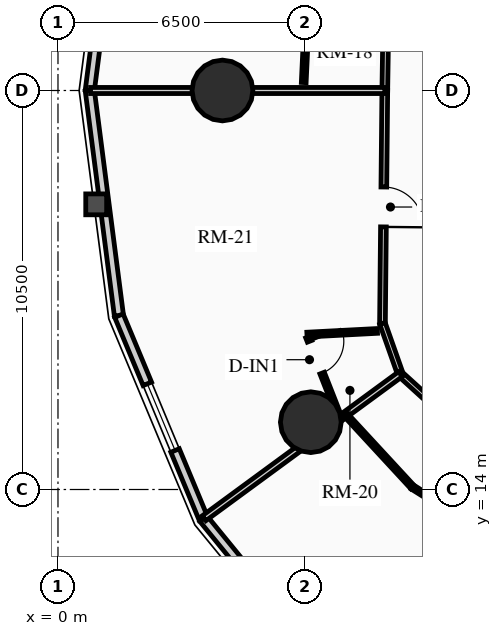
"""IFC4 building model, lengths in metres.
Left out: names, types, materials, properties, quantities, classifications, styles, units other than length and angle.
Written with IfcOpenShell. Run it as: python <this file> out.ifc"""

import sys

from ifc_helpers import new_model, si_unit, direction, frame, frame_2d, origin, origin_2d, place, context, subcontext, project, spatial, rectangle, circle, extrude, source, transform, mapped, element, fill, save


model = new_model("IFC4")
c1 = context("Model", 3, precision=1e-05, world=origin(), true_north=direction((0.0, 1.0)))
c2 = subcontext(c1, "Body", "Model", "MODEL_VIEW")
j1 = project(units=[si_unit("LENGTHUNIT", "METRE"), si_unit("PLANEANGLEUNIT", "RADIAN")], contexts=[c1])
p1 = place(None, origin())
s1 = spatial("IfcSite", under=j1, at=p1, CompositionType="ELEMENT")
p2 = place(p1, origin())
s2 = spatial("IfcBuilding", under=s1, at=p2, CompositionType="ELEMENT")
p3 = place(p2, frame((0.0, 0.0, 51.1)))
s3 = spatial("IfcBuildingStorey", under=s2, at=p3, CompositionType="ELEMENT", Elevation=51.1)
for number, where, z_axis, x_axis in (
    (1, (4.328, 24.5, 0.0), (0.0, 0.0, 1.0), (1.0, 0.0, 0.0)),
    (2, (6.653, 15.771, 0.0), (0.0, 0.0, 1.0), (1.0, 0.0, 0.0)),
):
    element("IfcColumn", number, at=place(p3, frame(where, z_axis=z_axis, x_axis=x_axis)), inside=s3, PredefinedType="USERDEFINED", context=c2, shape_type="SweptSolid", body=[
        extrude(circle(Radius=0.8, at=origin_2d()), origin(), (0.0, 0.0, 1.0), 2.91),
    ])
p4 = place(p3, frame((0.837, 24.5, 0.0), z_axis=(0.0, 0.0, 1.0), x_axis=(0.128339641463, 0.991730274031, 0.0)))
e3 = element("IfcWall", 3, at=p4, inside=s3, PredefinedType="SOLIDWALL", context=c2, shape_type="SweptSolid", body=[
    extrude(rectangle(XDim=5.973, YDim=0.24, at=frame_2d((2.987, 0.0))), origin(), (0.0, 0.0, 1.0), 2.073),
])
m1 = source(origin(), c2, "Body", "SweptSolid", [
    extrude(rectangle(XDim=2.2, YDim=1.35, at=frame_2d((1.1, 0.675))), frame((0.0, 0.13, 0.0), z_axis=(0.0, -1.0, 0.0), x_axis=(1.0, 0.0, 0.0)), (0.0, 0.0, 1.0), 0.26),
])
p5 = place(p4, frame((1.887, 0.0, 0.65)))
e4 = element("IfcOpeningElement", 4, at=p5, cuts=e3, PredefinedType="OPENING", context=c2, shape_type="MappedRepresentation", body=[
    mapped(m1, transform((0.0, 0.0, 0.0), x_axis=(1.0, 0.0, 0.0), y_axis=(0.0, 1.0, 0.0), z_axis=(0.0, 0.0, 1.0), scale=1.0)),
])
p6 = place(p3, frame((1.604, 18.576, 0.0), z_axis=(0.0, 0.0, 1.0), x_axis=(-0.128339641463, 0.991730274031, 0.0)))
e5 = element("IfcWall", 5, at=p6, inside=s3, PredefinedType="SOLIDWALL", context=c2, shape_type="SweptSolid", body=[
    extrude(rectangle(XDim=5.973, YDim=0.24, at=frame_2d((2.987, 0.0))), origin(), (0.0, 0.0, 1.0), 2.073),
])
p7 = place(p3, frame((3.828, 13.232, 0.0), z_axis=(0.0, 0.0, 1.0), x_axis=(-0.384348836956, 0.923187939442, 0.0)))
e6 = element("IfcWall", 6, at=p7, inside=s3, PredefinedType="SOLIDWALL", context=c2, shape_type="SweptSolid", body=[
    extrude(rectangle(XDim=5.789, YDim=0.24, at=frame_2d((2.894, 0.0))), origin(), (0.0, 0.0, 1.0), 2.073),
])
m2 = source(origin(), c2, "Body", "SweptSolid", [
    extrude(rectangle(XDim=1.9, YDim=1.35, at=frame_2d((0.95, 0.675))), frame((0.0, 0.13, 0.0), z_axis=(0.0, -1.0, 0.0), x_axis=(1.0, 0.0, 0.0)), (0.0, 0.0, 1.0), 0.26),
])
p8 = place(p7, frame((1.944, 0.0, 0.65)))
e7 = element("IfcOpeningElement", 7, at=p8, cuts=e6, PredefinedType="OPENING", context=c2, shape_type="MappedRepresentation", body=[
    mapped(m2, transform((0.0, 0.0, 0.0), x_axis=(1.0, 0.0, 0.0), y_axis=(0.0, 1.0, 0.0), z_axis=(0.0, 0.0, 1.0), scale=1.0)),
])
p9 = place(p3, frame((7.293, 8.991, 0.0), z_axis=(0.0, 0.0, 1.0), x_axis=(-0.632713287022, 0.77438614168, 0.0)))
e8 = element("IfcWall", 8, at=p9, inside=s3, PredefinedType="SOLIDWALL", context=c2, shape_type="SweptSolid", body=[
    extrude(rectangle(XDim=5.477, YDim=0.24, at=frame_2d((2.738, 0.0))), origin(), (0.0, 0.0, 1.0), 2.073),
])
p10 = place(p3, frame((8.693, 30.512, 0.0), z_axis=(0.0, 0.0, 1.0), x_axis=(-0.015389665197, -0.99988157209, 0.0)))
e9 = element("IfcWall", 9, at=p10, inside=s3, PredefinedType="PARTITIONING", context=c2, shape_type="SweptSolid", body=[
    extrude(rectangle(XDim=6.012, YDim=0.15, at=frame_2d((3.006, 0.0))), origin(), (0.0, 0.0, 1.0), 2.635),
])
p11 = place(p3, frame((8.6, 24.5, 0.0), z_axis=(0.0, 0.0, 1.0), x_axis=(-0.010076760723, -0.999949228158, 0.0)))
e10 = element("IfcWall", 10, at=p11, inside=s3, PredefinedType="PARTITIONING", context=c2, shape_type="SweptSolid", body=[
    extrude(rectangle(XDim=6.13, YDim=0.15, at=frame_2d((3.065, 0.0))), origin(), (0.0, 0.0, 1.0), 2.159),
])
m3 = source(origin(), c2, "Body", "SweptSolid", [
    extrude(rectangle(XDim=1.05, YDim=2.015, at=frame_2d((0.525, 1.007))), frame((0.0, 0.085, 0.0), z_axis=(0.0, -1.0, 0.0), x_axis=(1.0, 0.0, 0.0)), (0.0, 0.0, 1.0), 0.17),
])
p12 = place(p11, frame((2.54, 0.0, 0.0)))
e11 = element("IfcOpeningElement", 11, at=p12, cuts=e10, PredefinedType="OPENING", context=c2, shape_type="MappedRepresentation", body=[
    mapped(m3, transform((0.0, 0.0, 0.0), x_axis=(1.0, 0.0, 0.0), y_axis=(0.0, 1.0, 0.0), z_axis=(0.0, 0.0, 1.0), scale=1.0)),
])
p13 = place(p3, frame((8.538, 18.371, 0.0), z_axis=(0.0, 0.0, 1.0), x_axis=(0.3330273821, -0.942917155837, 0.0)))
e12 = element("IfcWall", 12, at=p13, inside=s3, PredefinedType="PARTITIONING", context=c2, shape_type="SweptSolid", body=[
    extrude(rectangle(XDim=1.417, YDim=0.15, at=frame_2d((0.708, 0.0))), origin(), (0.0, 0.0, 1.0), 2.205),
])
p14 = place(p3, frame((9.01, 17.034, 0.0), z_axis=(0.0, 0.0, 1.0), x_axis=(0.739733009791, -0.672900493554, 0.0)))
e13 = element("IfcWall", 13, at=p14, inside=s3, PredefinedType="PARTITIONING", context=c2, shape_type="SweptSolid", body=[
    extrude(rectangle(XDim=1.494, YDim=0.15, at=frame_2d((0.747, 0.0))), origin(), (0.0, 0.0, 1.0), 2.159),
])
p15 = place(p3, frame((8.6, 24.5, 0.0), z_axis=(0.0, 0.0, 1.0), x_axis=(-1.0, 0.0, 0.0)))
e14 = element("IfcWall", 14, at=p15, inside=s3, PredefinedType="PARTITIONING", context=c2, shape_type="SweptSolid", body=[
    extrude(rectangle(XDim=7.743, YDim=0.16, at=frame_2d((3.872, 0.0))), origin(), (0.0, 0.0, 1.0), 2.073),
])
p16 = place(p3, frame((9.01, 17.034, 0.0), z_axis=(0.0, 0.0, 1.0), x_axis=(-0.806234156757, -0.591596555499, 0.0)))
e15 = element("IfcWall", 15, at=p16, inside=s3, PredefinedType="PARTITIONING", context=c2, shape_type="SweptSolid", body=[
    extrude(rectangle(XDim=6.407, YDim=0.16, at=frame_2d((3.204, 0.0))), origin(), (0.0, 0.0, 1.0), 2.073),
])
p17 = place(p3, frame((6.6, 27.583, 0.0), z_axis=(0.0, 0.0, 1.0), x_axis=(-0.046516553412, -0.998917519247, 0.0)))
e16 = element("IfcWall", 16, at=p17, inside=s3, PredefinedType="PARTITIONING", context=c2, shape_type="SweptSolid", body=[
    extrude(rectangle(XDim=2.876, YDim=0.125, at=frame_2d((1.438, 0.0))), origin(), (0.0, 0.0, 1.0), 2.635),
])
m4 = source(origin(), c2, "Body", "SweptSolid", [
    extrude(rectangle(XDim=0.9, YDim=2.005, at=frame_2d((0.45, 1.002))), frame((0.0, 0.073, 0.0), z_axis=(0.0, -1.0, 0.0), x_axis=(1.0, 0.0, 0.0)), (0.0, 0.0, 1.0), 0.145),
])
p18 = place(p17, frame((0.12, 0.0, 0.0)))
e17 = element("IfcOpeningElement", 17, at=p18, cuts=e16, PredefinedType="OPENING", context=c2, shape_type="MappedRepresentation", body=[
    mapped(m4, transform((0.0, 0.0, 0.0), x_axis=(1.0, 0.0, 0.0), y_axis=(0.0, 1.0, 0.0), z_axis=(0.0, 0.0, 1.0), scale=1.0)),
])
p19 = place(p3, frame((8.404, 18.173, 0.0), z_axis=(0.0, 0.0, 1.0), x_axis=(-0.998640999178, -0.052116741655, 0.0)))
e18 = element("IfcWall", 18, at=p19, inside=s3, PredefinedType="PARTITIONING", context=c2, shape_type="SweptSolid", body=[
    extrude(rectangle(XDim=1.855, YDim=0.125, at=frame_2d((0.927, 0.0))), origin(), (0.0, 0.0, 1.0), 2.205),
])
p20 = place(p3, frame((6.577, 18.012, 0.0), z_axis=(0.0, 0.0, 1.0), x_axis=(0.366179258149, -0.930544330433, 0.0)))
e19 = element("IfcWall", 19, at=p20, inside=s3, PredefinedType="PARTITIONING", context=c2, shape_type="SweptSolid", body=[
    extrude(rectangle(XDim=2.208, YDim=0.125, at=frame_2d((1.104, 0.0))), origin(), (0.0, 0.0, 1.0), 2.159),
])
p21 = place(p20, frame((0.12, 0.0, 0.0)))
e20 = element("IfcOpeningElement", 20, at=p21, cuts=e19, PredefinedType="OPENING", context=c2, shape_type="MappedRepresentation", body=[
    mapped(m4, transform((0.0, 0.0, 0.0), x_axis=(1.0, 0.0, 0.0), y_axis=(0.0, 1.0, 0.0), z_axis=(0.0, 0.0, 1.0), scale=1.0)),
])
p22 = place(p3, frame((7.564, 15.973, 0.0), z_axis=(0.0, 0.0, 1.0), x_axis=(0.678576389573, -0.734529838409, 0.0)))
e21 = element("IfcWall", 21, at=p22, inside=s3, PredefinedType="PARTITIONING", context=c2, shape_type="SweptSolid", body=[
    extrude(rectangle(XDim=2.601, YDim=0.125, at=frame_2d((1.3, 0.0))), origin(), (0.0, 0.0, 1.0), 2.635),
])
p23 = place(p3, frame((9.329, 14.063, 0.0), z_axis=(0.0, 0.0, 1.0), x_axis=(0.846882074778, -0.531780736225, 0.0)))
e22 = element("IfcWall", 22, at=p23, inside=s3, PredefinedType="PARTITIONING", context=c2, shape_type="SweptSolid", body=[
    extrude(rectangle(XDim=2.585, YDim=0.125, at=frame_2d((1.292, 0.0))), origin(), (0.0, 0.0, 1.0), 2.205),
])
m5 = source(origin(), c2, "Body", "SweptSolid", [
    extrude(rectangle(XDim=1.9, YDim=1.35, at=frame_2d((0.95, 0.675))), frame((0.0, 0.03, 0.0), z_axis=(0.0, -1.0, 0.0), x_axis=(1.0, 0.0, 0.0)), (0.0, 0.0, 1.0), 0.06),
])
p24 = place(p8, origin())
e23 = element("IfcWindow", 23, at=p24, inside=s3, PartitioningType="DOUBLE_PANEL_VERTICAL", PredefinedType="WINDOW", context=c2, shape_type="MappedRepresentation", body=[
    mapped(m5, transform((0.0, 0.0, 0.0), x_axis=(1.0, 0.0, 0.0), y_axis=(0.0, 1.0, 0.0), z_axis=(0.0, 0.0, 1.0), scale=1.0)),
])
fill(e7, e23)
m6 = source(origin(), c2, "Body", "SweptSolid", [
    extrude(rectangle(XDim=1.05, YDim=2.015, at=frame_2d((0.525, 1.007))), frame((0.0, 0.025, 0.0), z_axis=(0.0, -1.0, 0.0), x_axis=(1.0, 0.0, 0.0)), (0.0, 0.0, 1.0), 0.05),
])
p25 = place(p12, origin())
e24 = element("IfcDoor", 24, at=p25, inside=s3, OperationType="SINGLE_SWING_RIGHT", PredefinedType="DOOR", context=c2, shape_type="MappedRepresentation", body=[
    mapped(m6, transform((0.0, 0.0, 0.0), x_axis=(1.0, 0.0, 0.0), y_axis=(0.0, 1.0, 0.0), z_axis=(0.0, 0.0, 1.0), scale=1.0)),
])
fill(e11, e24)
m7 = source(origin(), c2, "Body", "SweptSolid", [
    extrude(rectangle(XDim=0.9, YDim=2.005, at=frame_2d((0.45, 1.002))), frame((0.0, 0.025, 0.0), z_axis=(0.0, -1.0, 0.0), x_axis=(1.0, 0.0, 0.0)), (0.0, 0.0, 1.0), 0.05),
])
p26 = place(p21, origin())
e25 = element("IfcDoor", 25, at=p26, inside=s3, OperationType="SINGLE_SWING_LEFT", PredefinedType="DOOR", context=c2, shape_type="MappedRepresentation", body=[
    mapped(m7, transform((0.0, 0.0, 0.0), x_axis=(1.0, 0.0, 0.0), y_axis=(0.0, 1.0, 0.0), z_axis=(0.0, 0.0, 1.0), scale=1.0)),
])
fill(e20, e25)
save(model, sys.argv[1])
